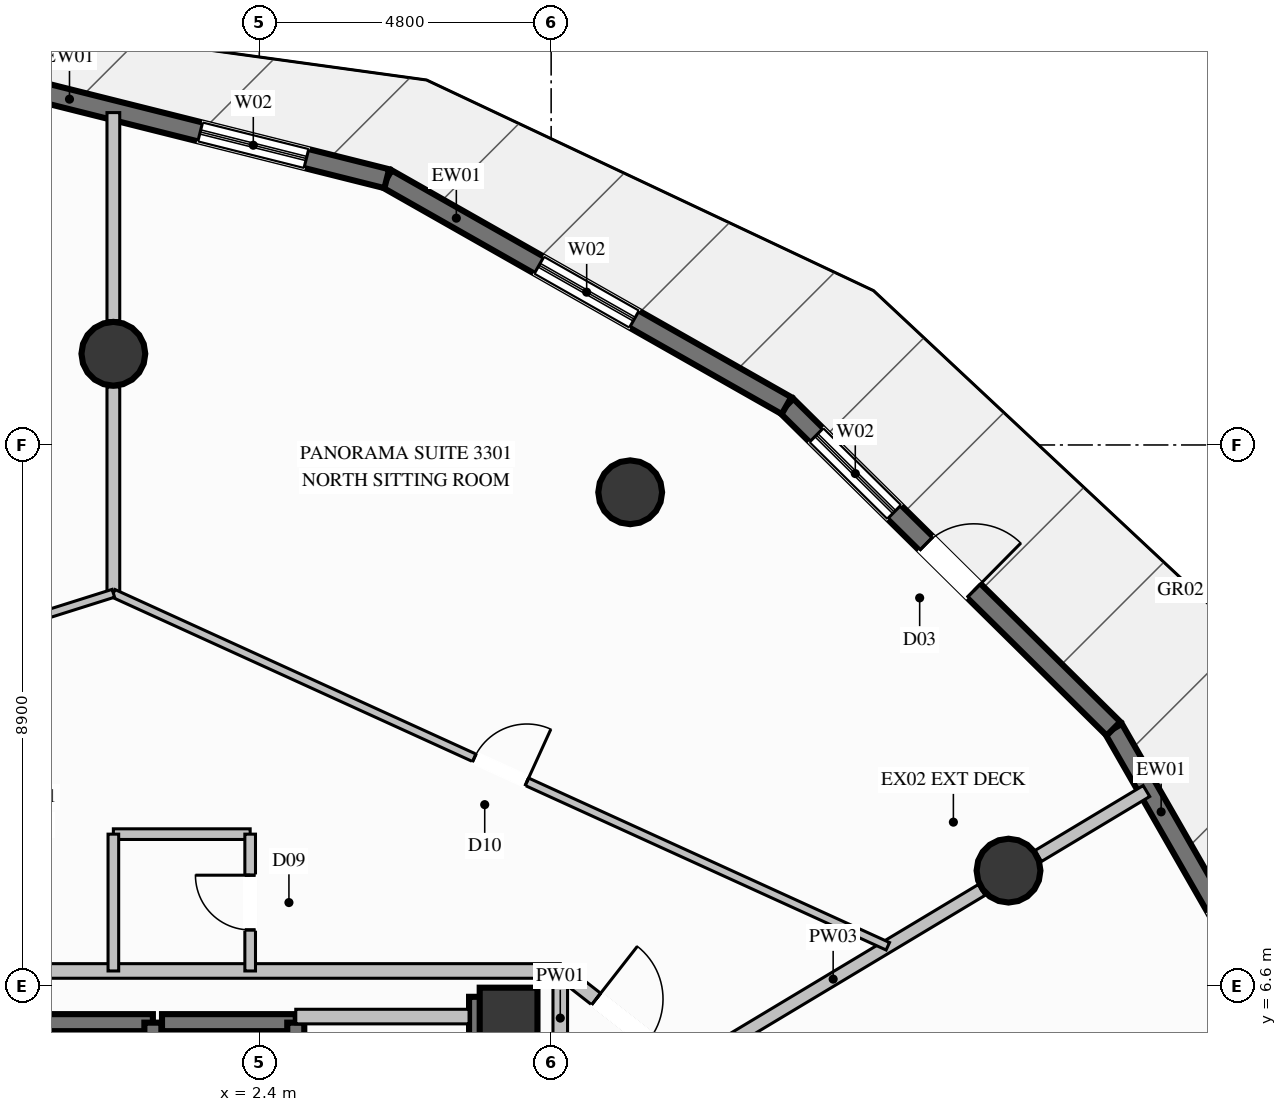
"""IFC4 building model, lengths in metres.
Left out: names, types, materials, properties, quantities, classifications, styles, units other than length and angle.
Written with IfcOpenShell. Run it as: python <this file> out.ifc"""

import sys

from ifc_helpers import new_model, si_unit, direction, frame, frame_2d, origin, origin_2d, place, context, subcontext, project, spatial, rectangle, circle, extrude, element, fill, save


model = new_model("IFC4")
c1 = context("Model", 3, precision=1e-05, world=origin(), true_north=direction((0.0, 1.0)))
c2 = subcontext(c1, "Body", "Model", "MODEL_VIEW")
j1 = project(units=[si_unit("LENGTHUNIT", "METRE"), si_unit("PLANEANGLEUNIT", "RADIAN")], contexts=[c1])
p1 = place(None, origin())
s1 = spatial("IfcSite", under=j1, at=p1, CompositionType="ELEMENT")
p2 = place(p1, origin())
s2 = spatial("IfcBuilding", under=s1, at=p2, CompositionType="ELEMENT")
p3 = place(p2, frame((0.0, 0.0, 124.2)))
s3 = spatial("IfcBuildingStorey", under=s2, at=p3, CompositionType="ELEMENT", Elevation=124.2)
p4 = place(p3, frame((6.5, 6.1, 0.0), z_axis=(0.0, 0.0, 1.0), x_axis=(1.0, 0.0, 0.0)))
e1 = element("IfcColumn", 1, at=p4, inside=s3, PredefinedType="COLUMN", context=c2, shape_type="SweptSolid", body=[
    extrude(rectangle(XDim=0.95, YDim=0.95, at=origin_2d()), origin(), (0.0, 0.0, 1.0), 3.6),
])
p5 = place(p3, frame((5.85, 6.1, 0.0), z_axis=(0.0, 0.0, 1.0), x_axis=(1.0, 0.0, 0.0)))
e2 = element("IfcWall", 2, at=p5, inside=s3, PredefinedType="SHEAR", context=c2, shape_type="SweptSolid", body=[
    extrude(rectangle(XDim=0.325, YDim=0.65, at=frame_2d((0.163, 0.0))), origin(), (0.0, 0.0, 1.0), 3.6),
])
p6 = place(p3, frame((6.5, 3.35, 0.0), z_axis=(0.0, 0.0, 1.0), x_axis=(0.0, 1.0, 0.0)))
e3 = element("IfcWall", 3, at=p6, inside=s3, PredefinedType="SHEAR", context=c2, shape_type="SweptSolid", body=[
    extrude(rectangle(XDim=3.075, YDim=0.65, at=frame_2d((1.538, 0.0))), origin(), (0.0, 0.0, 1.0), 3.6),
])
for number, where, z_axis, x_axis in (
    (4, (14.722, 8.5, 0.0), (0.0, 0.0, 1.0), (1.0, 0.0, 0.0)),
    (5, (8.5, 14.722, 0.0), (0.0, 0.0, 1.0), (1.0, 0.0, 0.0)),
    (6, (0.0, 17.0, 0.0), (0.0, 0.0, 1.0), (1.0, 0.0, 0.0)),
):
    element("IfcColumn", number, at=place(p3, frame(where, z_axis=z_axis, x_axis=x_axis)), inside=s3, PredefinedType="COLUMN", context=c2, shape_type="SweptSolid", body=[
        extrude(circle(Radius=0.525, at=origin_2d()), origin(), (0.0, 0.0, 1.0), 3.6),
    ])
p7 = place(p3, frame((16.448, 10.834, 0.0), z_axis=(0.0, 0.0, 1.0), x_axis=(0.497401787227, -0.8675202949, 0.0)))
e7 = element("IfcWall", 7, at=p7, inside=s3, PredefinedType="SOLIDWALL", context=c2, shape_type="SweptSolid", body=[
    extrude(rectangle(XDim=7.346, YDim=0.32, at=frame_2d((3.673, 0.0))), origin(), (0.0, 0.0, 1.0), 3.35),
])
p8 = place(p7, frame((3.403, 0.0, 0.35)))
e8 = element("IfcOpeningElement", 8, at=p8, cuts=e7, PredefinedType="OPENING", context=c2, shape_type="SweptSolid", body=[
    extrude(rectangle(XDim=1.8, YDim=2.6, at=frame_2d((0.9, 1.3))), frame((0.0, 0.17, 0.0), z_axis=(0.0, -1.0, 0.0), x_axis=(1.0, 0.0, 0.0)), (0.0, 0.0, 1.0), 0.34),
])
p9 = place(p3, frame((11.071, 16.147, 0.0), z_axis=(0.0, 0.0, 1.0), x_axis=(0.711325125038, -0.702863120735, 0.0)))
e9 = element("IfcWall", 9, at=p9, inside=s3, PredefinedType="SOLIDWALL", context=c2, shape_type="SweptSolid", body=[
    extrude(rectangle(XDim=7.559, YDim=0.32, at=frame_2d((3.78, 0.0))), origin(), (0.0, 0.0, 1.0), 3.35),
])
p10 = place(p9, frame((0.69, 0.0, 0.35)))
e10 = element("IfcOpeningElement", 10, at=p10, cuts=e9, PredefinedType="OPENING", context=c2, shape_type="SweptSolid", body=[
    extrude(rectangle(XDim=1.8, YDim=2.6, at=frame_2d((0.9, 1.3))), frame((0.0, 0.17, 0.0), z_axis=(0.0, -1.0, 0.0), x_axis=(1.0, 0.0, 0.0)), (0.0, 0.0, 1.0), 0.34),
])
p11 = place(p9, frame((3.23, 0.0, 0.0)))
e11 = element("IfcOpeningElement", 11, at=p11, cuts=e9, PredefinedType="OPENING", context=c2, shape_type="SweptSolid", body=[
    extrude(rectangle(XDim=1.1, YDim=2.2, at=frame_2d((0.55, 1.1))), frame((0.0, 0.17, 0.0), z_axis=(0.0, -1.0, 0.0), x_axis=(1.0, 0.0, 0.0)), (0.0, 0.0, 1.0), 0.34),
])
p12 = place(p3, frame((4.497, 19.879, 0.0), z_axis=(0.0, 0.0, 1.0), x_axis=(0.869642820433, -0.493681440678, 0.0)))
e12 = element("IfcWall", 12, at=p12, inside=s3, PredefinedType="SOLIDWALL", context=c2, shape_type="SweptSolid", body=[
    extrude(rectangle(XDim=7.559, YDim=0.32, at=frame_2d((3.78, 0.0))), origin(), (0.0, 0.0, 1.0), 3.35),
])
p13 = place(p12, frame((2.88, 0.0, 0.35)))
e13 = element("IfcOpeningElement", 13, at=p13, cuts=e12, PredefinedType="OPENING", context=c2, shape_type="SweptSolid", body=[
    extrude(rectangle(XDim=1.8, YDim=2.6, at=frame_2d((0.9, 1.3))), frame((0.0, 0.17, 0.0), z_axis=(0.0, -1.0, 0.0), x_axis=(1.0, 0.0, 0.0)), (0.0, 0.0, 1.0), 0.34),
])
p14 = place(p3, frame((-2.629, 21.665, 0.0), z_axis=(0.0, 0.0, 1.0), x_axis=(0.969993748762, -0.243129856994, 0.0)))
e14 = element("IfcWall", 14, at=p14, inside=s3, PredefinedType="SOLIDWALL", context=c2, shape_type="SweptSolid", body=[
    extrude(rectangle(XDim=7.346, YDim=0.32, at=frame_2d((3.673, 0.0))), origin(), (0.0, 0.0, 1.0), 3.35),
])
p15 = place(p14, frame((4.183, 0.0, 0.35)))
e15 = element("IfcOpeningElement", 15, at=p15, cuts=e14, PredefinedType="OPENING", context=c2, shape_type="SweptSolid", body=[
    extrude(rectangle(XDim=1.8, YDim=2.6, at=frame_2d((0.9, 1.3))), frame((0.0, 0.17, 0.0), z_axis=(0.0, -1.0, 0.0), x_axis=(1.0, 0.0, 0.0)), (0.0, 0.0, 1.0), 0.34),
])
p16 = place(p3, frame((0.65, 6.0, 0.0), z_axis=(0.0, 0.0, 1.0), x_axis=(-1.0, 0.0, 0.0)))
e16 = element("IfcWall", 16, at=p16, inside=s3, PredefinedType="SOLIDWALL", context=c2, shape_type="SweptSolid", body=[
    extrude(rectangle(XDim=2.1, YDim=0.28, at=frame_2d((1.05, 0.0))), origin(), (0.0, 0.0, 1.0), 3.35),
])
p17 = place(p3, frame((0.65, 3.5, 0.0), z_axis=(0.0, 0.0, 1.0), x_axis=(0.0, 1.0, 0.0)))
e17 = element("IfcWall", 17, at=p17, inside=s3, PredefinedType="SOLIDWALL", context=c2, shape_type="SweptSolid", body=[
    extrude(rectangle(XDim=2.5, YDim=0.28, at=frame_2d((1.25, 0.0))), origin(), (0.0, 0.0, 1.0), 3.35),
])
p18 = place(p3, frame((3.0, 6.0, 0.0), z_axis=(0.0, 0.0, 1.0), x_axis=(-1.0, 0.0, 0.0)))
e18 = element("IfcWall", 18, at=p18, inside=s3, PredefinedType="SOLIDWALL", context=c2, shape_type="SweptSolid", body=[
    extrude(rectangle(XDim=2.2, YDim=0.28, at=frame_2d((1.1, 0.0))), origin(), (0.0, 0.0, 1.0), 3.35),
])
p19 = place(p3, frame((3.0, 3.5, 0.0), z_axis=(0.0, 0.0, 1.0), x_axis=(0.0, 1.0, 0.0)))
e19 = element("IfcWall", 19, at=p19, inside=s3, PredefinedType="SOLIDWALL", context=c2, shape_type="SweptSolid", body=[
    extrude(rectangle(XDim=2.5, YDim=0.28, at=frame_2d((1.25, 0.0))), origin(), (0.0, 0.0, 1.0), 3.35),
])
p20 = place(p3, frame((-7.35, 6.85, 0.0), z_axis=(0.0, 0.0, 1.0), x_axis=(1.0, 0.0, 0.0)))
e20 = element("IfcWall", 20, at=p20, inside=s3, PredefinedType="PARTITIONING", context=c2, shape_type="SweptSolid", body=[
    extrude(rectangle(XDim=14.7, YDim=0.24, at=frame_2d((7.35, 0.0))), origin(), (0.0, 0.0, 1.0), 2.435),
])
p21 = place(p3, frame((7.35, 5.3, 0.0), z_axis=(0.0, 0.0, 1.0), x_axis=(0.0, 1.0, 0.0)))
e21 = element("IfcWall", 21, at=p21, inside=s3, PredefinedType="PARTITIONING", context=c2, shape_type="SweptSolid", body=[
    extrude(rectangle(XDim=1.55, YDim=0.24, at=frame_2d((0.775, 0.0))), origin(), (0.0, 0.0, 1.0), 2.435),
])
p22 = place(p3, frame((3.0, 6.1, 0.0), z_axis=(0.0, 0.0, 1.0), x_axis=(1.0, 0.0, 0.0)))
e22 = element("IfcWall", 22, at=p22, inside=s3, PredefinedType="PARTITIONING", context=c2, shape_type="SweptSolid", body=[
    extrude(rectangle(XDim=2.85, YDim=0.24, at=frame_2d((1.425, 0.0))), origin(), (0.0, 0.0, 1.0), 2.435),
])
p23 = place(p3, frame((9.396, 5.25, 0.0), z_axis=(0.0, 0.0, 1.0), x_axis=(0.857379456535, 0.514684823471, 0.0)))
e23 = element("IfcWall", 23, at=p23, inside=s3, PredefinedType="PARTITIONING", context=c2, shape_type="SweptSolid", body=[
    extrude(rectangle(XDim=5.697, YDim=0.21, at=frame_2d((2.848, 0.0))), origin(), (0.0, 0.0, 1.0), 2.791),
])
p24 = place(p3, frame((15.211, 8.741, 0.0), z_axis=(0.0, 0.0, 1.0), x_axis=(0.857347553721, 0.51473796453, 0.0)))
e24 = element("IfcWall", 24, at=p24, inside=s3, PredefinedType="PARTITIONING", context=c2, shape_type="SweptSolid", body=[
    extrude(rectangle(XDim=2.075, YDim=0.21, at=frame_2d((1.038, 0.0))), origin(), (0.0, 0.0, 1.0), 3.35),
])
for number, where, z_axis, x_axis in (
    (25, (0.0, 9.1, 0.0), (0.0, 0.0, 1.0), (1.0, 0.0, 0.0)),
    (26, (0.0, 9.1, 0.0), (0.0, 0.0, 1.0), (0.0, -1.0, 0.0)),
):
    element("IfcWall", number, at=place(p3, frame(where, z_axis=z_axis, x_axis=x_axis)), inside=s3, PredefinedType="PLUMBINGWALL", context=c2, shape_type="SweptSolid", body=[
        extrude(rectangle(XDim=2.25, YDim=0.175, at=frame_2d((1.125, 0.0))), origin(), (0.0, 0.0, 1.0), 3.35),
    ])
p25 = place(p3, frame((2.25, 6.85, 0.0), z_axis=(0.0, 0.0, 1.0), x_axis=(0.0, 1.0, 0.0)))
e27 = element("IfcWall", 27, at=p25, inside=s3, PredefinedType="PLUMBINGWALL", context=c2, shape_type="SweptSolid", body=[
    extrude(rectangle(XDim=2.25, YDim=0.175, at=frame_2d((1.125, 0.0))), origin(), (0.0, 0.0, 1.0), 3.35),
])
p26 = place(p25, frame((0.675, 0.0, 0.0)))
e28 = element("IfcOpeningElement", 28, at=p26, cuts=e27, PredefinedType="OPENING", context=c2, shape_type="SweptSolid", body=[
    extrude(rectangle(XDim=0.9, YDim=2.1, at=frame_2d((0.45, 1.05))), frame((0.0, 0.098, 0.0), z_axis=(0.0, -1.0, 0.0), x_axis=(1.0, 0.0, 0.0)), (0.0, 0.0, 1.0), 0.195),
])
p27 = place(p3, frame((7.35, 6.85, 0.0), z_axis=(0.0, 0.0, 1.0), x_axis=(0.7876993483, -0.6160598483, 0.0)))
e29 = element("IfcWall", 29, at=p27, inside=s3, PredefinedType="PARTITIONING", context=c2, shape_type="SweptSolid", body=[
    extrude(rectangle(XDim=2.597, YDim=0.24, at=frame_2d((1.299, 0.0))), origin(), (0.0, 0.0, 1.0), 3.35),
])
p28 = place(p27, frame((0.749, 0.0, 0.0)))
e30 = element("IfcOpeningElement", 30, at=p28, cuts=e29, PredefinedType="OPENING", context=c2, shape_type="SweptSolid", body=[
    extrude(rectangle(XDim=1.1, YDim=2.3, at=frame_2d((0.55, 1.15))), frame((0.0, 0.13, 0.0), z_axis=(0.0, -1.0, 0.0), x_axis=(1.0, 0.0, 0.0)), (0.0, 0.0, 1.0), 0.26),
])
p29 = place(p3, frame((0.0, 13.061, 0.0), z_axis=(0.0, 0.0, 1.0), x_axis=(0.0, 1.0, 0.0)))
e31 = element("IfcWall", 31, at=p29, inside=s3, PredefinedType="PARTITIONING", context=c2, shape_type="SweptSolid", body=[
    extrude(rectangle(XDim=3.394, YDim=0.21, at=frame_2d((1.697, 0.0))), origin(), (0.0, 0.0, 1.0), 3.35),
])
p30 = place(p3, frame((0.0, 17.545, 0.0), z_axis=(0.0, 0.0, 1.0), x_axis=(0.0, 1.0, 0.0)))
e32 = element("IfcWall", 32, at=p30, inside=s3, PredefinedType="PARTITIONING", context=c2, shape_type="SweptSolid", body=[
    extrude(rectangle(XDim=3.421, YDim=0.21, at=frame_2d((1.71, 0.0))), origin(), (0.0, 0.0, 1.0), 3.35),
])
p31 = place(p3, frame((0.0, 13.061, 0.0), z_axis=(0.0, 0.0, 1.0), x_axis=(0.909952678095, -0.414712097277, 0.0)))
e33 = element("IfcWall", 33, at=p31, inside=s3, PredefinedType="PARTITIONING", context=c2, shape_type="SweptSolid", body=[
    extrude(rectangle(XDim=13.998, YDim=0.135, at=frame_2d((6.999, 0.0))), origin(), (0.0, 0.0, 1.0), 3.35),
])
p32 = place(p31, frame((6.524, 0.0, 0.0)))
e34 = element("IfcOpeningElement", 34, at=p32, cuts=e33, PredefinedType="OPENING", context=c2, shape_type="SweptSolid", body=[
    extrude(rectangle(XDim=0.95, YDim=2.1, at=frame_2d((0.475, 1.05))), frame((0.0, 0.078, 0.0), z_axis=(0.0, -1.0, 0.0), x_axis=(1.0, 0.0, 0.0)), (0.0, 0.0, 1.0), 0.155),
])
p33 = place(p3, frame((-14.737, 8.411, 0.0), z_axis=(0.0, 0.0, 1.0), x_axis=(0.953650690157, 0.300915870573, 0.0)))
e35 = element("IfcWall", 35, at=p33, inside=s3, PredefinedType="PARTITIONING", context=c2, shape_type="SweptSolid", body=[
    extrude(rectangle(XDim=15.453, YDim=0.135, at=frame_2d((7.727, 0.0))), origin(), (0.0, 0.0, 1.0), 2.879),
])
p34 = place(p33, frame((7.252, 0.0, 0.0)))
e36 = element("IfcOpeningElement", 36, at=p34, cuts=e35, PredefinedType="OPENING", context=c2, shape_type="SweptSolid", body=[
    extrude(rectangle(XDim=0.95, YDim=2.1, at=frame_2d((0.475, 1.05))), frame((0.0, 0.078, 0.0), z_axis=(0.0, -1.0, 0.0), x_axis=(1.0, 0.0, 0.0)), (0.0, 0.0, 1.0), 0.155),
])
p35 = place(p10, origin())
e37 = element("IfcWindow", 37, at=p35, inside=s3, PartitioningType="SINGLE_PANEL", PredefinedType="WINDOW", context=c2, shape_type="SweptSolid", body=[
    extrude(rectangle(XDim=1.8, YDim=2.6, at=frame_2d((0.9, 1.3))), frame((0.0, 0.03, 0.0), z_axis=(0.0, -1.0, 0.0), x_axis=(1.0, 0.0, 0.0)), (0.0, 0.0, 1.0), 0.06),
])
fill(e10, e37)
p36 = place(p11, origin())
e38 = element("IfcDoor", 38, at=p36, inside=s3, OperationType="SINGLE_SWING_RIGHT", PredefinedType="DOOR", context=c2, shape_type="SweptSolid", body=[
    extrude(rectangle(XDim=1.1, YDim=2.2, at=frame_2d((0.55, 1.1))), frame((0.0, 0.025, 0.0), z_axis=(0.0, -1.0, 0.0), x_axis=(1.0, 0.0, 0.0)), (0.0, 0.0, 1.0), 0.05),
])
fill(e11, e38)
p37 = place(p13, origin())
e39 = element("IfcWindow", 39, at=p37, inside=s3, PartitioningType="SINGLE_PANEL", PredefinedType="WINDOW", context=c2, shape_type="SweptSolid", body=[
    extrude(rectangle(XDim=1.8, YDim=2.6, at=frame_2d((0.9, 1.3))), frame((0.0, 0.03, 0.0), z_axis=(0.0, -1.0, 0.0), x_axis=(1.0, 0.0, 0.0)), (0.0, 0.0, 1.0), 0.06),
])
fill(e13, e39)
p38 = place(p15, origin())
e40 = element("IfcWindow", 40, at=p38, inside=s3, PartitioningType="SINGLE_PANEL", PredefinedType="WINDOW", context=c2, shape_type="SweptSolid", body=[
    extrude(rectangle(XDim=1.8, YDim=2.6, at=frame_2d((0.9, 1.3))), frame((0.0, 0.03, 0.0), z_axis=(0.0, -1.0, 0.0), x_axis=(1.0, 0.0, 0.0)), (0.0, 0.0, 1.0), 0.06),
])
fill(e15, e40)
p39 = place(p26, origin())
e41 = element("IfcDoor", 41, at=p39, inside=s3, OperationType="SINGLE_SWING_RIGHT", PredefinedType="DOOR", context=c2, shape_type="SweptSolid", body=[
    extrude(rectangle(XDim=0.9, YDim=2.1, at=frame_2d((0.45, 1.05))), frame((0.0, 0.025, 0.0), z_axis=(0.0, -1.0, 0.0), x_axis=(1.0, 0.0, 0.0)), (0.0, 0.0, 1.0), 0.05),
])
fill(e28, e41)
p40 = place(p28, origin())
e42 = element("IfcDoor", 42, at=p40, inside=s3, OperationType="SINGLE_SWING_LEFT", PredefinedType="DOOR", context=c2, shape_type="SweptSolid", body=[
    extrude(rectangle(XDim=1.1, YDim=2.3, at=frame_2d((0.55, 1.15))), frame((0.0, 0.025, 0.0), z_axis=(0.0, -1.0, 0.0), x_axis=(1.0, 0.0, 0.0)), (0.0, 0.0, 1.0), 0.05),
])
fill(e30, e42)
p41 = place(p32, origin())
e43 = element("IfcDoor", 43, at=p41, inside=s3, OperationType="SINGLE_SWING_RIGHT", PredefinedType="DOOR", context=c2, shape_type="SweptSolid", body=[
    extrude(rectangle(XDim=0.95, YDim=2.1, at=frame_2d((0.475, 1.05))), frame((0.0, 0.025, 0.0), z_axis=(0.0, -1.0, 0.0), x_axis=(1.0, 0.0, 0.0)), (0.0, 0.0, 1.0), 0.05),
])
fill(e34, e43)
save(model, sys.argv[1])
